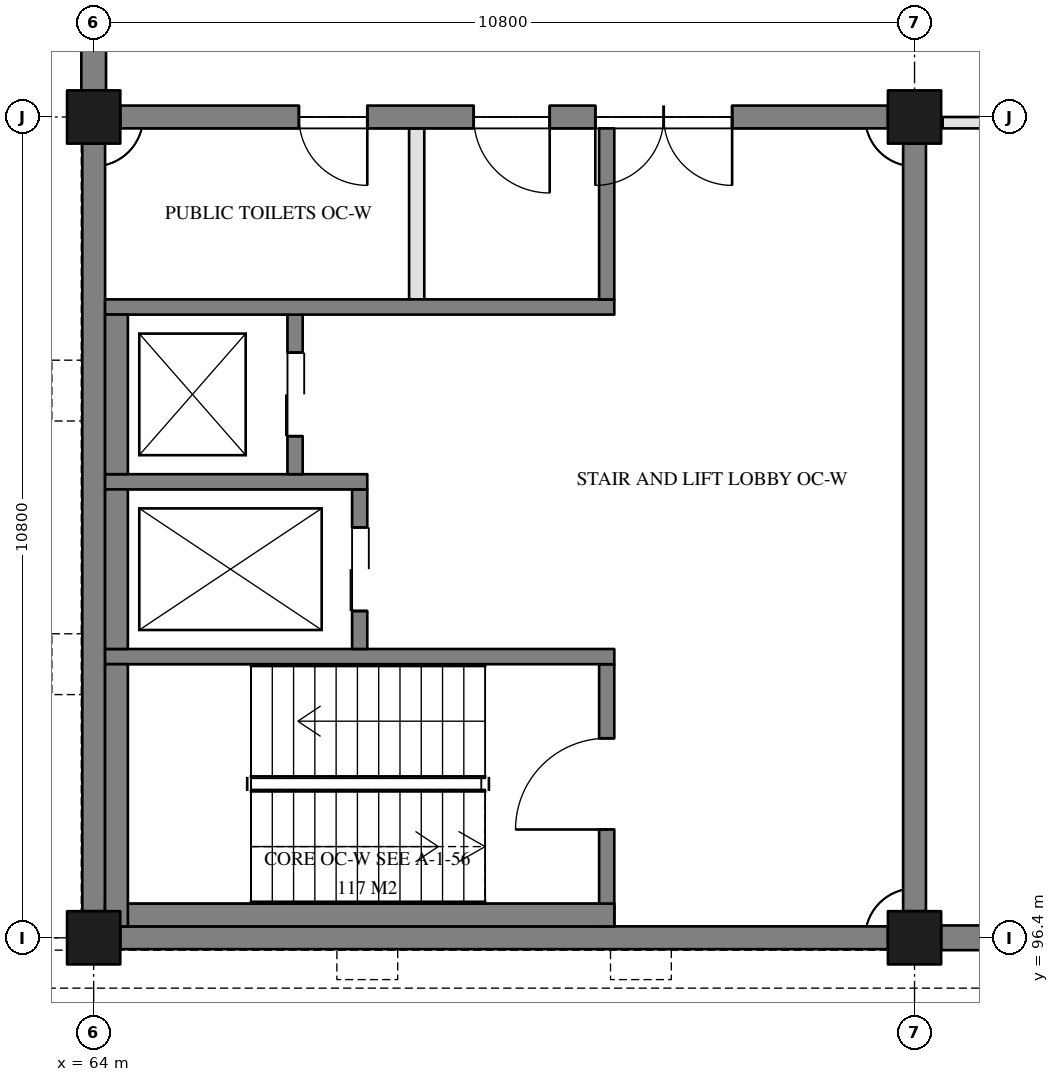
"""IFC4 building model, lengths in metres.
Left out: names, types, materials, properties, quantities, classifications, styles, units other than length and angle.
Written with IfcOpenShell. Run it as: python <this file> out.ifc"""

import sys

from ifc_helpers import new_model, si_unit, direction, frame, frame_2d, origin, origin_2d, place, context, subcontext, project, spatial, rectangle, extrude, element, fill, save


model = new_model("IFC4")
c1 = context("Model", 3, precision=1e-05, world=origin(), true_north=direction((0.0, 1.0)))
c2 = subcontext(c1, "Body", "Model", "MODEL_VIEW")
j1 = project(units=[si_unit("LENGTHUNIT", "METRE"), si_unit("PLANEANGLEUNIT", "RADIAN")], contexts=[c1])
p1 = place(None, origin())
s1 = spatial("IfcSite", under=j1, at=p1, CompositionType="ELEMENT")
p2 = place(p1, origin())
s2 = spatial("IfcBuilding", under=s1, at=p2, CompositionType="ELEMENT")
p3 = place(p2, frame((0.0, 0.0, 16.5)))
s3 = spatial("IfcBuildingStorey", under=s2, at=p3, CompositionType="ELEMENT", Elevation=16.5)
for number, where, z_axis, x_axis in (
    (1, (64.0, 96.4, 0.0), (0.0, 0.0, 1.0), (1.0, 0.0, 0.0)),
    (2, (64.0, 107.2, 0.0), (0.0, 0.0, 1.0), (1.0, 0.0, 0.0)),
    (3, (74.8, 96.4, 0.0), (0.0, 0.0, 1.0), (1.0, 0.0, 0.0)),
    (4, (74.8, 107.2, 0.0), (0.0, 0.0, 1.0), (1.0, 0.0, 0.0)),
):
    element("IfcColumn", number, at=place(p3, frame(where, z_axis=z_axis, x_axis=x_axis)), inside=s3, PredefinedType="COLUMN", context=c2, shape_type="SweptSolid", body=[
        extrude(rectangle(XDim=0.7, YDim=0.7, at=origin_2d()), origin(), (0.0, 0.0, 1.0), 3.9),
    ])
p4 = place(p3, frame((64.35, 96.4, 0.0), z_axis=(0.0, 0.0, 1.0), x_axis=(1.0, 0.0, 0.0)))
e5 = element("IfcWall", 5, at=p4, inside=s3, PredefinedType="SOLIDWALL", context=c2, shape_type="SweptSolid", body=[
    extrude(rectangle(XDim=10.1, YDim=0.3, at=frame_2d((5.05, 0.0))), origin(), (0.0, 0.0, 1.0), 3.9),
])
p5 = place(p3, frame((74.8, 96.75, 0.0), z_axis=(0.0, 0.0, 1.0), x_axis=(0.0, 1.0, 0.0)))
e6 = element("IfcWall", 6, at=p5, inside=s3, PredefinedType="SOLIDWALL", context=c2, shape_type="SweptSolid", body=[
    extrude(rectangle(XDim=10.1, YDim=0.3, at=frame_2d((5.05, 0.0))), origin(), (0.0, 0.0, 1.0), 3.9),
])
p6 = place(p3, frame((74.45, 107.2, 0.0), z_axis=(0.0, 0.0, 1.0), x_axis=(-1.0, 0.0, 0.0)))
e7 = element("IfcWall", 7, at=p6, inside=s3, PredefinedType="SOLIDWALL", context=c2, shape_type="SweptSolid", body=[
    extrude(rectangle(XDim=10.1, YDim=0.3, at=frame_2d((5.05, 0.0))), origin(), (0.0, 0.0, 1.0), 3.9),
])
p7 = place(p6, frame((2.05, 0.0, 0.0)))
e8 = element("IfcOpeningElement", 8, at=p7, cuts=e7, PredefinedType="OPENING", context=c2, shape_type="SweptSolid", body=[
    extrude(rectangle(XDim=1.8, YDim=2.1, at=frame_2d((0.9, 1.05))), frame((0.0, 0.16, 0.0), z_axis=(0.0, -1.0, 0.0), x_axis=(1.0, 0.0, 0.0)), (0.0, 0.0, 1.0), 0.32),
])
p8 = place(p6, frame((4.45, 0.0, 0.0)))
e9 = element("IfcOpeningElement", 9, at=p8, cuts=e7, PredefinedType="OPENING", context=c2, shape_type="SweptSolid", body=[
    extrude(rectangle(XDim=1.0, YDim=2.1, at=frame_2d((0.5, 1.05))), frame((0.0, 0.16, 0.0), z_axis=(0.0, -1.0, 0.0), x_axis=(1.0, 0.0, 0.0)), (0.0, 0.0, 1.0), 0.32),
])
p9 = place(p6, frame((6.85, 0.0, 0.0)))
e10 = element("IfcOpeningElement", 10, at=p9, cuts=e7, PredefinedType="OPENING", context=c2, shape_type="SweptSolid", body=[
    extrude(rectangle(XDim=0.9, YDim=2.1, at=frame_2d((0.45, 1.05))), frame((0.0, 0.16, 0.0), z_axis=(0.0, -1.0, 0.0), x_axis=(1.0, 0.0, 0.0)), (0.0, 0.0, 1.0), 0.32),
])
p10 = place(p3, frame((64.0, 106.85, 0.0), z_axis=(0.0, 0.0, 1.0), x_axis=(0.0, -1.0, 0.0)))
e11 = element("IfcWall", 11, at=p10, inside=s3, PredefinedType="SOLIDWALL", context=c2, shape_type="SweptSolid", body=[
    extrude(rectangle(XDim=10.1, YDim=0.3, at=frame_2d((5.05, 0.0))), origin(), (0.0, 0.0, 1.0), 3.9),
])
p11 = place(p3, frame((75.15, 96.4, 0.0), z_axis=(0.0, 0.0, 1.0), x_axis=(1.0, 0.0, 0.0)))
e12 = element("IfcWall", 12, at=p11, inside=s3, PredefinedType="SOLIDWALL", context=c2, shape_type="SweptSolid", body=[
    extrude(rectangle(XDim=10.1, YDim=0.325, at=frame_2d((5.05, 0.0))), origin(), (0.0, 0.0, 1.0), 2.8),
])
p12 = place(p11, frame((0.85, 0.0, 0.75)))
e13 = element("IfcOpeningElement", 13, at=p12, cuts=e12, PredefinedType="OPENING", context=c2, shape_type="SweptSolid", body=[
    extrude(rectangle(XDim=1.2, YDim=1.95, at=frame_2d((0.6, 0.975))), frame((0.0, 0.172, 0.0), z_axis=(0.0, -1.0, 0.0), x_axis=(1.0, 0.0, 0.0)), (0.0, 0.0, 1.0), 0.345),
])
p13 = place(p11, frame((4.45, 0.0, 0.75)))
e14 = element("IfcOpeningElement", 14, at=p13, cuts=e12, PredefinedType="OPENING", context=c2, shape_type="SweptSolid", body=[
    extrude(rectangle(XDim=1.2, YDim=1.95, at=frame_2d((0.6, 0.975))), frame((0.0, 0.172, 0.0), z_axis=(0.0, -1.0, 0.0), x_axis=(1.0, 0.0, 0.0)), (0.0, 0.0, 1.0), 0.345),
])
p14 = place(p11, frame((8.05, 0.0, 0.75)))
e15 = element("IfcOpeningElement", 15, at=p14, cuts=e12, PredefinedType="OPENING", context=c2, shape_type="SweptSolid", body=[
    extrude(rectangle(XDim=1.2, YDim=1.95, at=frame_2d((0.6, 0.975))), frame((0.0, 0.172, 0.0), z_axis=(0.0, -1.0, 0.0), x_axis=(1.0, 0.0, 0.0)), (0.0, 0.0, 1.0), 0.345),
])
p15 = place(p3, frame((64.0, 107.55, 0.0), z_axis=(0.0, 0.0, 1.0), x_axis=(0.0, 1.0, 0.0)))
e16 = element("IfcWall", 16, at=p15, inside=s3, PredefinedType="SOLIDWALL", context=c2, shape_type="SweptSolid", body=[
    extrude(rectangle(XDim=3.85, YDim=0.325, at=frame_2d((1.925, 0.0))), origin(), (0.0, 0.0, 1.0), 2.8),
])
p16 = place(p15, frame((1.0, 0.0, 0.9)))
e17 = element("IfcOpeningElement", 17, at=p16, cuts=e16, PredefinedType="OPENING", context=c2, shape_type="SweptSolid", body=[
    extrude(rectangle(XDim=0.9, YDim=1.8, at=frame_2d((0.45, 0.9))), frame((0.0, 0.172, 0.0), z_axis=(0.0, -1.0, 0.0), x_axis=(1.0, 0.0, 0.0)), (0.0, 0.0, 1.0), 0.345),
])
p17 = place(p3, frame((70.75, 96.55, 0.0), z_axis=(0.0, 0.0, 1.0), x_axis=(0.0, 1.0, 0.0)))
e18 = element("IfcWall", 18, at=p17, inside=s3, PredefinedType="SOLIDWALL", context=c2, shape_type="SweptSolid", body=[
    extrude(rectangle(XDim=3.45, YDim=0.2, at=frame_2d((1.725, 0.0))), origin(), (0.0, 0.0, 1.0), 3.6),
])
p18 = place(p17, frame((1.275, 0.0, 0.0)))
e19 = element("IfcOpeningElement", 19, at=p18, cuts=e18, PredefinedType="OPENING", context=c2, shape_type="SweptSolid", body=[
    extrude(rectangle(XDim=1.2, YDim=2.1, at=frame_2d((0.6, 1.05))), frame((0.0, 0.11, 0.0), z_axis=(0.0, -1.0, 0.0), x_axis=(1.0, 0.0, 0.0)), (0.0, 0.0, 1.0), 0.22),
])
p19 = place(p3, frame((70.85, 100.1, 0.0), z_axis=(0.0, 0.0, 1.0), x_axis=(-1.0, 0.0, 0.0)))
e20 = element("IfcWall", 20, at=p19, inside=s3, PredefinedType="SOLIDWALL", context=c2, shape_type="SweptSolid", body=[
    extrude(rectangle(XDim=6.7, YDim=0.2, at=frame_2d((3.35, 0.0))), origin(), (0.0, 0.0, 1.0), 3.6),
])
p20 = place(p3, frame((67.5, 100.2, 0.0), z_axis=(0.0, 0.0, 1.0), x_axis=(0.0, 1.0, 0.0)))
e21 = element("IfcWall", 21, at=p20, inside=s3, PredefinedType="SOLIDWALL", context=c2, shape_type="SweptSolid", body=[
    extrude(rectangle(XDim=2.1, YDim=0.2, at=frame_2d((1.05, 0.0))), origin(), (0.0, 0.0, 1.0), 3.6),
])
p21 = place(p20, frame((0.5, 0.0, 0.0)))
e22 = element("IfcOpeningElement", 22, at=p21, cuts=e21, PredefinedType="OPENING", context=c2, shape_type="SweptSolid", body=[
    extrude(rectangle(XDim=1.1, YDim=2.1, at=frame_2d((0.55, 1.05))), frame((0.0, 0.11, 0.0), z_axis=(0.0, -1.0, 0.0), x_axis=(1.0, 0.0, 0.0)), (0.0, 0.0, 1.0), 0.22),
])
p22 = place(p3, frame((67.6, 102.4, 0.0), z_axis=(0.0, 0.0, 1.0), x_axis=(-1.0, 0.0, 0.0)))
e23 = element("IfcWall", 23, at=p22, inside=s3, PredefinedType="SOLIDWALL", context=c2, shape_type="SweptSolid", body=[
    extrude(rectangle(XDim=3.45, YDim=0.2, at=frame_2d((1.725, 0.0))), origin(), (0.0, 0.0, 1.0), 3.6),
])
p23 = place(p3, frame((66.65, 102.5, 0.0), z_axis=(0.0, 0.0, 1.0), x_axis=(0.0, 1.0, 0.0)))
e24 = element("IfcWall", 24, at=p23, inside=s3, PredefinedType="SOLIDWALL", context=c2, shape_type="SweptSolid", body=[
    extrude(rectangle(XDim=2.1, YDim=0.2, at=frame_2d((1.05, 0.0))), origin(), (0.0, 0.0, 1.0), 3.6),
])
p24 = place(p23, frame((0.5, 0.0, 0.0)))
e25 = element("IfcOpeningElement", 25, at=p24, cuts=e24, PredefinedType="OPENING", context=c2, shape_type="SweptSolid", body=[
    extrude(rectangle(XDim=1.1, YDim=2.1, at=frame_2d((0.55, 1.05))), frame((0.0, 0.11, 0.0), z_axis=(0.0, -1.0, 0.0), x_axis=(1.0, 0.0, 0.0)), (0.0, 0.0, 1.0), 0.22),
])
p25 = place(p3, frame((70.85, 104.7, 0.0), z_axis=(0.0, 0.0, 1.0), x_axis=(-1.0, 0.0, 0.0)))
e26 = element("IfcWall", 26, at=p25, inside=s3, PredefinedType="SOLIDWALL", context=c2, shape_type="SweptSolid", body=[
    extrude(rectangle(XDim=6.7, YDim=0.2, at=frame_2d((3.35, 0.0))), origin(), (0.0, 0.0, 1.0), 3.6),
])
p26 = place(p3, frame((70.75, 104.8, 0.0), z_axis=(0.0, 0.0, 1.0), x_axis=(0.0, 1.0, 0.0)))
e27 = element("IfcWall", 27, at=p26, inside=s3, PredefinedType="SOLIDWALL", context=c2, shape_type="SweptSolid", body=[
    extrude(rectangle(XDim=2.25, YDim=0.2, at=frame_2d((1.125, 0.0))), origin(), (0.0, 0.0, 1.0), 3.6),
])
p27 = place(p3, frame((70.85, 96.7, -0.3), z_axis=(0.0, 0.0, 1.0), x_axis=(-1.0, 0.0, 0.0)))
e28 = element("IfcWall", 28, at=p27, inside=s3, PredefinedType="SOLIDWALL", context=c2, shape_type="SweptSolid", body=[
    extrude(rectangle(XDim=6.7, YDim=0.3, at=frame_2d((3.35, 0.0))), origin(), (0.0, 0.0, 1.0), 3.9),
])
p28 = place(p3, frame((64.3, 96.55, -0.3), z_axis=(0.0, 0.0, 1.0), x_axis=(0.0, 1.0, 0.0)))
e29 = element("IfcWall", 29, at=p28, inside=s3, PredefinedType="SOLIDWALL", context=c2, shape_type="SweptSolid", body=[
    extrude(rectangle(XDim=3.45, YDim=0.3, at=frame_2d((1.725, 0.0))), origin(), (0.0, 0.0, 1.0), 3.9),
])
for number, where, z_axis, x_axis in (
    (30, (64.3, 100.2, -0.3), (0.0, 0.0, 1.0), (0.0, 1.0, 0.0)),
    (31, (64.3, 102.5, -0.3), (0.0, 0.0, 1.0), (0.0, 1.0, 0.0)),
):
    element("IfcWall", number, at=place(p3, frame(where, z_axis=z_axis, x_axis=x_axis)), inside=s3, PredefinedType="SOLIDWALL", context=c2, shape_type="SweptSolid", body=[
        extrude(rectangle(XDim=2.1, YDim=0.3, at=frame_2d((1.05, 0.0))), origin(), (0.0, 0.0, 1.0), 3.9),
    ])
p29 = place(p3, frame((68.25, 104.8, 0.0), z_axis=(0.0, 0.0, 1.0), x_axis=(0.0, 1.0, 0.0)))
e32 = element("IfcWall", 32, at=p29, inside=s3, PredefinedType="PARTITIONING", context=c2, shape_type="SweptSolid", body=[
    extrude(rectangle(XDim=2.25, YDim=0.2, at=frame_2d((1.125, 0.0))), origin(), (0.0, 0.0, 1.0), 3.6),
])
p30 = place(p3, frame((75.17, 107.125, 0.0), z_axis=(0.0, 0.0, 1.0), x_axis=(1.0, 0.0, 0.0)))
e33 = element("IfcWall", 33, at=p30, inside=s3, PredefinedType="PARTITIONING", context=c2, shape_type="SweptSolid", body=[
    extrude(rectangle(XDim=10.06, YDim=0.15, at=frame_2d((5.03, 0.0))), origin(), (0.0, 0.0, 1.0), 2.8),
])
p31 = place(p30, frame((4.13, 0.0, 0.0)))
e34 = element("IfcOpeningElement", 34, at=p31, cuts=e33, PredefinedType="OPENING", context=c2, shape_type="SweptSolid", body=[
    extrude(rectangle(XDim=1.8, YDim=2.1, at=frame_2d((0.9, 1.05))), frame((0.0, 0.085, 0.0), z_axis=(0.0, -1.0, 0.0), x_axis=(1.0, 0.0, 0.0)), (0.0, 0.0, 1.0), 0.17),
])
p32 = place(p21, frame((1.1, 0.0, 0.0), z_axis=(0.0, 0.0, 1.0), x_axis=(-1.0, 0.0, 0.0)))
e35 = element("IfcDoor", 35, at=p32, inside=s3, OperationType="DOUBLE_DOOR_SLIDING", PredefinedType="DOOR", context=c2, shape_type="SweptSolid", body=[
    extrude(rectangle(XDim=1.1, YDim=2.1, at=frame_2d((0.55, 1.05))), frame((0.0, 0.025, 0.0), z_axis=(0.0, -1.0, 0.0), x_axis=(1.0, 0.0, 0.0)), (0.0, 0.0, 1.0), 0.05),
])
fill(e22, e35)
p33 = place(p24, frame((1.1, 0.0, 0.0), z_axis=(0.0, 0.0, 1.0), x_axis=(-1.0, 0.0, 0.0)))
e36 = element("IfcDoor", 36, at=p33, inside=s3, OperationType="DOUBLE_DOOR_SLIDING", PredefinedType="DOOR", context=c2, shape_type="SweptSolid", body=[
    extrude(rectangle(XDim=1.1, YDim=2.1, at=frame_2d((0.55, 1.05))), frame((0.0, 0.025, 0.0), z_axis=(0.0, -1.0, 0.0), x_axis=(1.0, 0.0, 0.0)), (0.0, 0.0, 1.0), 0.05),
])
fill(e25, e36)
p34 = place(p18, frame((1.2, 0.0, 0.0), z_axis=(0.0, 0.0, 1.0), x_axis=(-1.0, 0.0, 0.0)))
e37 = element("IfcDoor", 37, at=p34, inside=s3, OperationType="SINGLE_SWING_LEFT", PredefinedType="DOOR", context=c2, shape_type="SweptSolid", body=[
    extrude(rectangle(XDim=1.2, YDim=2.1, at=frame_2d((0.6, 1.05))), frame((0.0, 0.025, 0.0), z_axis=(0.0, -1.0, 0.0), x_axis=(1.0, 0.0, 0.0)), (0.0, 0.0, 1.0), 0.05),
])
fill(e19, e37)
p35 = place(p7, frame((1.8, 0.0, 0.0), z_axis=(0.0, 0.0, 1.0), x_axis=(-1.0, 0.0, 0.0)))
e38 = element("IfcDoor", 38, at=p35, inside=s3, OperationType="DOUBLE_DOOR_DOUBLE_SWING", PredefinedType="DOOR", context=c2, shape_type="SweptSolid", body=[
    extrude(rectangle(XDim=1.8, YDim=2.1, at=frame_2d((0.9, 1.05))), frame((0.0, 0.025, 0.0), z_axis=(0.0, -1.0, 0.0), x_axis=(1.0, 0.0, 0.0)), (0.0, 0.0, 1.0), 0.05),
])
fill(e8, e38)
p36 = place(p8, origin())
e39 = element("IfcDoor", 39, at=p36, inside=s3, OperationType="SINGLE_SWING_LEFT", PredefinedType="DOOR", context=c2, shape_type="SweptSolid", body=[
    extrude(rectangle(XDim=1.0, YDim=2.1, at=frame_2d((0.5, 1.05))), frame((0.0, 0.025, 0.0), z_axis=(0.0, -1.0, 0.0), x_axis=(1.0, 0.0, 0.0)), (0.0, 0.0, 1.0), 0.05),
])
fill(e9, e39)
p37 = place(p9, origin())
e40 = element("IfcDoor", 40, at=p37, inside=s3, OperationType="SINGLE_SWING_RIGHT", PredefinedType="DOOR", context=c2, shape_type="SweptSolid", body=[
    extrude(rectangle(XDim=0.9, YDim=2.1, at=frame_2d((0.45, 1.05))), frame((0.0, 0.025, 0.0), z_axis=(0.0, -1.0, 0.0), x_axis=(1.0, 0.0, 0.0)), (0.0, 0.0, 1.0), 0.05),
])
fill(e10, e40)
save(model, sys.argv[1])
